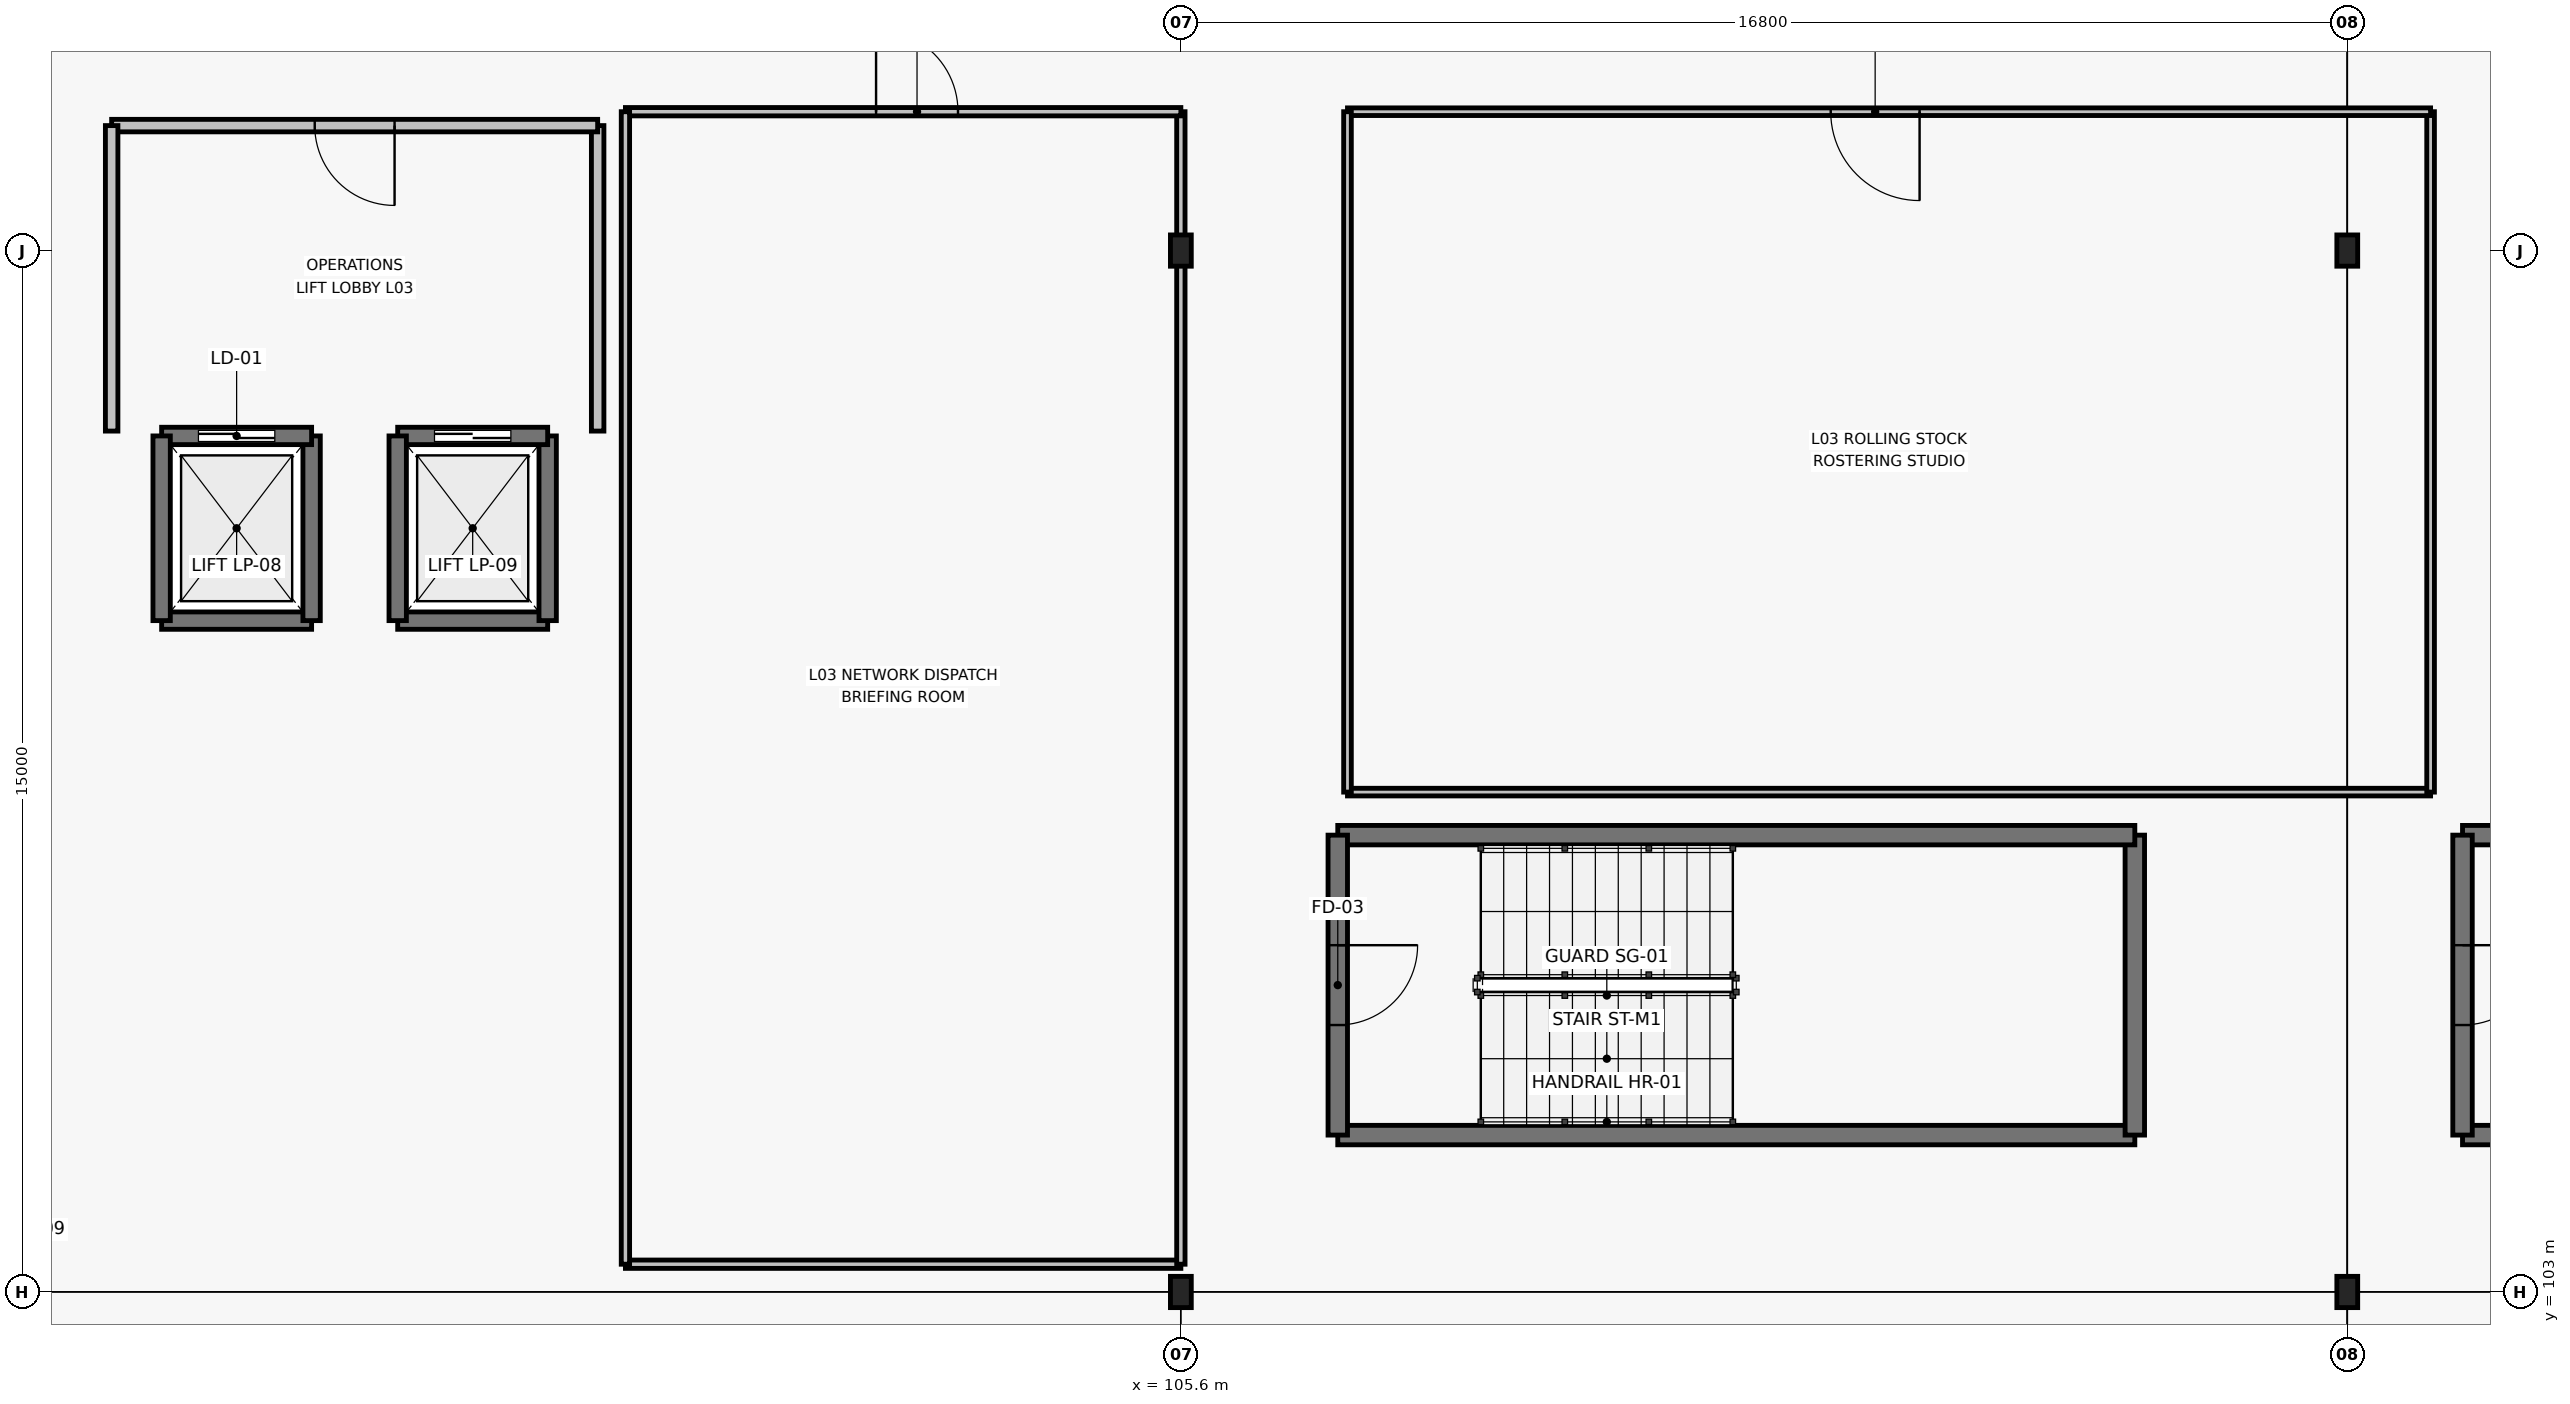
"""IFC4 building model, lengths in metres.
Left out: names, types, materials, properties, quantities, classifications, styles, units other than length and angle.
Written with IfcOpenShell. Run it as: python <this file> out.ifc"""

import sys

from ifc_helpers import new_model, si_unit, direction, frame, frame_2d, origin, origin_2d, place, context, subcontext, project, spatial, rectangle, i_section, extrude, element, fill, save


model = new_model("IFC4")
c1 = context("Model", 3, precision=1e-05, world=origin(), true_north=direction((0.0, 1.0)))
c2 = subcontext(c1, "Body", "Model", "MODEL_VIEW")
j1 = project(units=[si_unit("LENGTHUNIT", "METRE"), si_unit("PLANEANGLEUNIT", "RADIAN")], contexts=[c1])
p1 = place(None, origin())
s1 = spatial("IfcSite", under=j1, at=p1, CompositionType="ELEMENT")
p2 = place(p1, origin())
s2 = spatial("IfcBuilding", under=s1, at=p2, CompositionType="ELEMENT")
p3 = place(p2, frame((0.0, 0.0, 16.8)))
s3 = spatial("IfcBuildingStorey", under=s2, at=p3, CompositionType="ELEMENT", Elevation=16.8)
for number, where, z_axis, x_axis in (
    (1, (105.6, 103.0, 0.0), (0.0, 0.0, 1.0), (1.0, 0.0, 0.0)),
    (2, (105.6, 118.0, 0.0), (0.0, 0.0, 1.0), (1.0, 0.0, 0.0)),
    (3, (122.4, 103.0, 0.0), (0.0, 0.0, 1.0), (1.0, 0.0, 0.0)),
    (4, (122.4, 118.0, 0.0), (0.0, 0.0, 1.0), (1.0, 0.0, 0.0)),
):
    element("IfcColumn", number, at=place(p3, frame(where, z_axis=z_axis, x_axis=x_axis)), inside=s3, PredefinedType="COLUMN", context=c2, shape_type="SweptSolid", body=[
        extrude(i_section(OverallWidth=0.3, OverallDepth=0.45, WebThickness=0.014, FlangeThickness=0.026, FilletRadius=0.027, at=origin_2d()), origin(), (0.0, 0.0, 1.0), 4.2),
    ])
p4 = place(p3, frame((107.86, 105.26, 0.0), z_axis=(0.0, 0.0, 1.0), x_axis=(1.0, 0.0, 0.0)))
e5 = element("IfcWall", 5, at=p4, inside=s3, PredefinedType="SHEAR", context=c2, shape_type="SweptSolid", body=[
    extrude(rectangle(XDim=11.48, YDim=0.28, at=frame_2d((5.74, 0.0))), origin(), (0.0, 0.0, 1.0), 4.0),
])
p5 = place(p3, frame((119.34, 105.26, 0.0), z_axis=(0.0, 0.0, 1.0), x_axis=(0.0, 1.0, 0.0)))
e6 = element("IfcWall", 6, at=p5, inside=s3, PredefinedType="SHEAR", context=c2, shape_type="SweptSolid", body=[
    extrude(rectangle(XDim=4.32, YDim=0.28, at=frame_2d((2.16, 0.0))), origin(), (0.0, 0.0, 1.0), 4.0),
])
p6 = place(p3, frame((119.34, 109.58, 0.0), z_axis=(0.0, 0.0, 1.0), x_axis=(-1.0, 0.0, 0.0)))
e7 = element("IfcWall", 7, at=p6, inside=s3, PredefinedType="SHEAR", context=c2, shape_type="SweptSolid", body=[
    extrude(rectangle(XDim=11.48, YDim=0.28, at=frame_2d((5.74, 0.0))), origin(), (0.0, 0.0, 1.0), 4.0),
])
p7 = place(p3, frame((107.86, 109.58, 0.0), z_axis=(0.0, 0.0, 1.0), x_axis=(0.0, -1.0, 0.0)))
e8 = element("IfcWall", 8, at=p7, inside=s3, PredefinedType="SHEAR", context=c2, shape_type="SweptSolid", body=[
    extrude(rectangle(XDim=4.32, YDim=0.28, at=frame_2d((2.16, 0.0))), origin(), (0.0, 0.0, 1.0), 4.0),
])
p8 = place(p7, frame((1.585, 0.0, 0.0)))
e9 = element("IfcOpeningElement", 9, at=p8, cuts=e8, PredefinedType="OPENING", context=c2, shape_type="SweptSolid", body=[
    extrude(rectangle(XDim=1.15, YDim=2.2, at=frame_2d((0.575, 1.1))), frame((0.0, 0.15, 0.0), z_axis=(0.0, -1.0, 0.0), x_axis=(1.0, 0.0, 0.0)), (0.0, 0.0, 1.0), 0.3),
])
for number, where, z_axis, x_axis in (
    (10, (124.06, 105.26, 0.0), (0.0, 0.0, 1.0), (1.0, 0.0, 0.0)),
    (11, (135.54, 109.58, 0.0), (0.0, 0.0, 1.0), (-1.0, 0.0, 0.0)),
):
    element("IfcWall", number, at=place(p3, frame(where, z_axis=z_axis, x_axis=x_axis)), inside=s3, PredefinedType="SHEAR", context=c2, shape_type="SweptSolid", body=[
        extrude(rectangle(XDim=11.48, YDim=0.28, at=frame_2d((5.74, 0.0))), origin(), (0.0, 0.0, 1.0), 4.0),
    ])
p9 = place(p3, frame((124.06, 109.58, 0.0), z_axis=(0.0, 0.0, 1.0), x_axis=(0.0, -1.0, 0.0)))
e12 = element("IfcWall", 12, at=p9, inside=s3, PredefinedType="SHEAR", context=c2, shape_type="SweptSolid", body=[
    extrude(rectangle(XDim=4.32, YDim=0.28, at=frame_2d((2.16, 0.0))), origin(), (0.0, 0.0, 1.0), 4.0),
])
p10 = place(p9, frame((1.585, 0.0, 0.0)))
e13 = element("IfcOpeningElement", 13, at=p10, cuts=e12, PredefinedType="OPENING", context=c2, shape_type="SweptSolid", body=[
    extrude(rectangle(XDim=1.15, YDim=2.2, at=frame_2d((0.575, 1.1))), frame((0.0, 0.15, 0.0), z_axis=(0.0, -1.0, 0.0), x_axis=(1.0, 0.0, 0.0)), (0.0, 0.0, 1.0), 0.3),
])
p11 = place(p3, frame((90.92, 112.67, 0.0), z_axis=(0.0, 0.0, 1.0), x_axis=(1.0, 0.0, 0.0)))
e14 = element("IfcWall", 14, at=p11, inside=s3, PredefinedType="SHEAR", context=c2, shape_type="SweptSolid", body=[
    extrude(rectangle(XDim=2.16, YDim=0.25, at=frame_2d((1.08, 0.0))), origin(), (0.0, 0.0, 1.0), 4.0),
])
p12 = place(p3, frame((93.08, 112.67, 0.0), z_axis=(0.0, 0.0, 1.0), x_axis=(0.0, 1.0, 0.0)))
e15 = element("IfcWall", 15, at=p12, inside=s3, PredefinedType="SHEAR", context=c2, shape_type="SweptSolid", body=[
    extrude(rectangle(XDim=2.66, YDim=0.25, at=frame_2d((1.33, 0.0))), origin(), (0.0, 0.0, 1.0), 4.0),
])
p13 = place(p3, frame((93.08, 115.33, 0.0), z_axis=(0.0, 0.0, 1.0), x_axis=(-1.0, 0.0, 0.0)))
e16 = element("IfcWall", 16, at=p13, inside=s3, PredefinedType="SHEAR", context=c2, shape_type="SweptSolid", body=[
    extrude(rectangle(XDim=2.16, YDim=0.25, at=frame_2d((1.08, 0.0))), origin(), (0.0, 0.0, 1.0), 4.0),
])
p14 = place(p13, frame((0.53, 0.0, 0.0)))
e17 = element("IfcOpeningElement", 17, at=p14, cuts=e16, PredefinedType="OPENING", context=c2, shape_type="SweptSolid", body=[
    extrude(rectangle(XDim=1.1, YDim=2.2, at=frame_2d((0.55, 1.1))), frame((0.0, 0.135, 0.0), z_axis=(0.0, -1.0, 0.0), x_axis=(1.0, 0.0, 0.0)), (0.0, 0.0, 1.0), 0.27),
])
p15 = place(p3, frame((90.92, 115.33, 0.0), z_axis=(0.0, 0.0, 1.0), x_axis=(0.0, -1.0, 0.0)))
e18 = element("IfcWall", 18, at=p15, inside=s3, PredefinedType="SHEAR", context=c2, shape_type="SweptSolid", body=[
    extrude(rectangle(XDim=2.66, YDim=0.25, at=frame_2d((1.33, 0.0))), origin(), (0.0, 0.0, 1.0), 4.0),
])
p16 = place(p3, frame((94.32, 112.67, 0.0), z_axis=(0.0, 0.0, 1.0), x_axis=(1.0, 0.0, 0.0)))
e19 = element("IfcWall", 19, at=p16, inside=s3, PredefinedType="SHEAR", context=c2, shape_type="SweptSolid", body=[
    extrude(rectangle(XDim=2.16, YDim=0.25, at=frame_2d((1.08, 0.0))), origin(), (0.0, 0.0, 1.0), 4.0),
])
p17 = place(p3, frame((96.48, 112.67, 0.0), z_axis=(0.0, 0.0, 1.0), x_axis=(0.0, 1.0, 0.0)))
e20 = element("IfcWall", 20, at=p17, inside=s3, PredefinedType="SHEAR", context=c2, shape_type="SweptSolid", body=[
    extrude(rectangle(XDim=2.66, YDim=0.25, at=frame_2d((1.33, 0.0))), origin(), (0.0, 0.0, 1.0), 4.0),
])
p18 = place(p3, frame((96.48, 115.33, 0.0), z_axis=(0.0, 0.0, 1.0), x_axis=(-1.0, 0.0, 0.0)))
e21 = element("IfcWall", 21, at=p18, inside=s3, PredefinedType="SHEAR", context=c2, shape_type="SweptSolid", body=[
    extrude(rectangle(XDim=2.16, YDim=0.25, at=frame_2d((1.08, 0.0))), origin(), (0.0, 0.0, 1.0), 4.0),
])
p19 = place(p18, frame((0.53, 0.0, 0.0)))
e22 = element("IfcOpeningElement", 22, at=p19, cuts=e21, PredefinedType="OPENING", context=c2, shape_type="SweptSolid", body=[
    extrude(rectangle(XDim=1.1, YDim=2.2, at=frame_2d((0.55, 1.1))), frame((0.0, 0.135, 0.0), z_axis=(0.0, -1.0, 0.0), x_axis=(1.0, 0.0, 0.0)), (0.0, 0.0, 1.0), 0.27),
])
p20 = place(p3, frame((94.32, 115.33, 0.0), z_axis=(0.0, 0.0, 1.0), x_axis=(0.0, -1.0, 0.0)))
e23 = element("IfcWall", 23, at=p20, inside=s3, PredefinedType="SHEAR", context=c2, shape_type="SweptSolid", body=[
    extrude(rectangle(XDim=2.66, YDim=0.25, at=frame_2d((1.33, 0.0))), origin(), (0.0, 0.0, 1.0), 4.0),
])
p21 = place(p3, frame((97.2, 115.4, 0.0), z_axis=(0.0, 0.0, 1.0), x_axis=(0.0, 1.0, 0.0)))
e24 = element("IfcWall", 24, at=p21, inside=s3, PredefinedType="PARTITIONING", context=c2, shape_type="SweptSolid", body=[
    extrude(rectangle(XDim=4.4, YDim=0.18, at=frame_2d((2.2, 0.0))), origin(), (0.0, 0.0, 1.0), 4.0),
])
p22 = place(p3, frame((97.2, 119.8, 0.0), z_axis=(0.0, 0.0, 1.0), x_axis=(-1.0, 0.0, 0.0)))
e25 = element("IfcWall", 25, at=p22, inside=s3, PredefinedType="PARTITIONING", context=c2, shape_type="SweptSolid", body=[
    extrude(rectangle(XDim=7.0, YDim=0.18, at=frame_2d((3.5, 0.0))), origin(), (0.0, 0.0, 1.0), 4.0),
])
p23 = place(p22, frame((2.925, 0.0, 0.0)))
e26 = element("IfcOpeningElement", 26, at=p23, cuts=e25, PredefinedType="OPENING", context=c2, shape_type="SweptSolid", body=[
    extrude(rectangle(XDim=1.15, YDim=2.2, at=frame_2d((0.575, 1.1))), frame((0.0, 0.1, 0.0), z_axis=(0.0, -1.0, 0.0), x_axis=(1.0, 0.0, 0.0)), (0.0, 0.0, 1.0), 0.2),
])
p24 = place(p3, frame((90.2, 119.8, 0.0), z_axis=(0.0, 0.0, 1.0), x_axis=(0.0, -1.0, 0.0)))
e27 = element("IfcWall", 27, at=p24, inside=s3, PredefinedType="PARTITIONING", context=c2, shape_type="SweptSolid", body=[
    extrude(rectangle(XDim=4.4, YDim=0.18, at=frame_2d((2.2, 0.0))), origin(), (0.0, 0.0, 1.0), 4.0),
])
p25 = place(p3, frame((97.6, 103.4, 0.0), z_axis=(0.0, 0.0, 1.0), x_axis=(1.0, 0.0, 0.0)))
e28 = element("IfcWall", 28, at=p25, inside=s3, PredefinedType="PARTITIONING", context=c2, shape_type="SweptSolid", body=[
    extrude(rectangle(XDim=8.0, YDim=0.12, at=frame_2d((4.0, 0.0))), origin(), (0.0, 0.0, 1.0), 3.605),
])
p26 = place(p3, frame((105.6, 103.4, 0.0), z_axis=(0.0, 0.0, 1.0), x_axis=(0.0, 1.0, 0.0)))
e29 = element("IfcWall", 29, at=p26, inside=s3, PredefinedType="PARTITIONING", context=c2, shape_type="SweptSolid", body=[
    extrude(rectangle(XDim=16.6, YDim=0.12, at=frame_2d((8.3, 0.0))), origin(), (0.0, 0.0, 1.0), 3.495),
])
p27 = place(p3, frame((105.6, 120.0, 0.0), z_axis=(0.0, 0.0, 1.0), x_axis=(-1.0, 0.0, 0.0)))
e30 = element("IfcWall", 30, at=p27, inside=s3, PredefinedType="PARTITIONING", context=c2, shape_type="SweptSolid", body=[
    extrude(rectangle(XDim=8.0, YDim=0.12, at=frame_2d((4.0, 0.0))), origin(), (0.0, 0.0, 1.0), 4.0),
])
p28 = place(p27, frame((3.21, 0.0, 0.0)))
e31 = element("IfcOpeningElement", 31, at=p28, cuts=e30, PredefinedType="OPENING", context=c2, shape_type="SweptSolid", body=[
    extrude(rectangle(XDim=1.18, YDim=2.18, at=frame_2d((0.59, 1.09))), frame((0.0, 0.07, 0.0), z_axis=(0.0, -1.0, 0.0), x_axis=(1.0, 0.0, 0.0)), (0.0, 0.0, 1.0), 0.14),
])
p29 = place(p3, frame((97.6, 120.0, 0.0), z_axis=(0.0, 0.0, 1.0), x_axis=(0.0, -1.0, 0.0)))
e32 = element("IfcWall", 32, at=p29, inside=s3, PredefinedType="PARTITIONING", context=c2, shape_type="SweptSolid", body=[
    extrude(rectangle(XDim=16.6, YDim=0.12, at=frame_2d((8.3, 0.0))), origin(), (0.0, 0.0, 1.0), 4.0),
])
p30 = place(p3, frame((108.0, 110.2, 0.0), z_axis=(0.0, 0.0, 1.0), x_axis=(1.0, 0.0, 0.0)))
e33 = element("IfcWall", 33, at=p30, inside=s3, PredefinedType="MOVABLE", context=c2, shape_type="SweptSolid", body=[
    extrude(rectangle(XDim=15.6, YDim=0.11, at=frame_2d((7.8, 0.0))), origin(), (0.0, 0.0, 1.0), 4.0),
])
p31 = place(p3, frame((123.6, 110.2, 0.0), z_axis=(0.0, 0.0, 1.0), x_axis=(0.0, 1.0, 0.0)))
e34 = element("IfcWall", 34, at=p31, inside=s3, PredefinedType="MOVABLE", context=c2, shape_type="SweptSolid", body=[
    extrude(rectangle(XDim=9.8, YDim=0.11, at=frame_2d((4.9, 0.0))), origin(), (0.0, 0.0, 1.0), 4.0),
])
p32 = place(p3, frame((123.6, 120.0, 0.0), z_axis=(0.0, 0.0, 1.0), x_axis=(-1.0, 0.0, 0.0)))
e35 = element("IfcWall", 35, at=p32, inside=s3, PredefinedType="MOVABLE", context=c2, shape_type="SweptSolid", body=[
    extrude(rectangle(XDim=15.6, YDim=0.11, at=frame_2d((7.8, 0.0))), origin(), (0.0, 0.0, 1.0), 4.0),
])
p33 = place(p32, frame((7.36, 0.0, 0.0)))
e36 = element("IfcOpeningElement", 36, at=p33, cuts=e35, PredefinedType="OPENING", context=c2, shape_type="SweptSolid", body=[
    extrude(rectangle(XDim=1.28, YDim=2.22, at=frame_2d((0.64, 1.11))), frame((0.0, 0.065, 0.0), z_axis=(0.0, -1.0, 0.0), x_axis=(1.0, 0.0, 0.0)), (0.0, 0.0, 1.0), 0.13),
])
p34 = place(p3, frame((108.0, 120.0, 0.0), z_axis=(0.0, 0.0, 1.0), x_axis=(0.0, -1.0, 0.0)))
e37 = element("IfcWall", 37, at=p34, inside=s3, PredefinedType="MOVABLE", context=c2, shape_type="SweptSolid", body=[
    extrude(rectangle(XDim=9.8, YDim=0.11, at=frame_2d((4.9, 0.0))), origin(), (0.0, 0.0, 1.0), 4.0),
])
p35 = place(p8, origin())
e38 = element("IfcDoor", 38, at=p35, inside=s3, OperationType="SINGLE_SWING_LEFT", PredefinedType="DOOR", context=c2, shape_type="SweptSolid", body=[
    extrude(rectangle(XDim=1.15, YDim=2.2, at=frame_2d((0.575, 1.1))), frame((0.0, 0.025, 0.0), z_axis=(0.0, -1.0, 0.0), x_axis=(1.0, 0.0, 0.0)), (0.0, 0.0, 1.0), 0.05),
])
fill(e9, e38)
p36 = place(p10, origin())
e39 = element("IfcDoor", 39, at=p36, inside=s3, OperationType="SINGLE_SWING_LEFT", PredefinedType="DOOR", context=c2, shape_type="SweptSolid", body=[
    extrude(rectangle(XDim=1.15, YDim=2.2, at=frame_2d((0.575, 1.1))), frame((0.0, 0.025, 0.0), z_axis=(0.0, -1.0, 0.0), x_axis=(1.0, 0.0, 0.0)), (0.0, 0.0, 1.0), 0.05),
])
fill(e13, e39)
p37 = place(p14, origin())
e40 = element("IfcDoor", 40, at=p37, inside=s3, OperationType="SLIDING_TO_LEFT", PredefinedType="DOOR", context=c2, shape_type="SweptSolid", body=[
    extrude(rectangle(XDim=1.1, YDim=2.2, at=frame_2d((0.55, 1.1))), frame((0.0, 0.025, 0.0), z_axis=(0.0, -1.0, 0.0), x_axis=(1.0, 0.0, 0.0)), (0.0, 0.0, 1.0), 0.05),
])
fill(e17, e40)
p38 = place(p19, origin())
e41 = element("IfcDoor", 41, at=p38, inside=s3, OperationType="SLIDING_TO_LEFT", PredefinedType="DOOR", context=c2, shape_type="SweptSolid", body=[
    extrude(rectangle(XDim=1.1, YDim=2.2, at=frame_2d((0.55, 1.1))), frame((0.0, 0.025, 0.0), z_axis=(0.0, -1.0, 0.0), x_axis=(1.0, 0.0, 0.0)), (0.0, 0.0, 1.0), 0.05),
])
fill(e22, e41)
p39 = place(p23, origin())
e42 = element("IfcDoor", 42, at=p39, inside=s3, OperationType="SINGLE_SWING_LEFT", PredefinedType="DOOR", context=c2, shape_type="SweptSolid", body=[
    extrude(rectangle(XDim=1.15, YDim=2.2, at=frame_2d((0.575, 1.1))), frame((0.0, 0.025, 0.0), z_axis=(0.0, -1.0, 0.0), x_axis=(1.0, 0.0, 0.0)), (0.0, 0.0, 1.0), 0.05),
])
fill(e26, e42)
p40 = place(p28, origin())
e43 = element("IfcDoor", 43, at=p40, inside=s3, OperationType="SINGLE_SWING_RIGHT", PredefinedType="DOOR", context=c2, shape_type="SweptSolid", body=[
    extrude(rectangle(XDim=1.18, YDim=2.18, at=frame_2d((0.59, 1.09))), frame((0.0, 0.025, 0.0), z_axis=(0.0, -1.0, 0.0), x_axis=(1.0, 0.0, 0.0)), (0.0, 0.0, 1.0), 0.05),
])
fill(e31, e43)
p41 = place(p33, origin())
e44 = element("IfcDoor", 44, at=p41, inside=s3, OperationType="SINGLE_SWING_LEFT", PredefinedType="DOOR", context=c2, shape_type="SweptSolid", body=[
    extrude(rectangle(XDim=1.28, YDim=2.22, at=frame_2d((0.64, 1.11))), frame((0.0, 0.025, 0.0), z_axis=(0.0, -1.0, 0.0), x_axis=(1.0, 0.0, 0.0)), (0.0, 0.0, 1.0), 0.05),
])
fill(e36, e44)
save(model, sys.argv[1])
